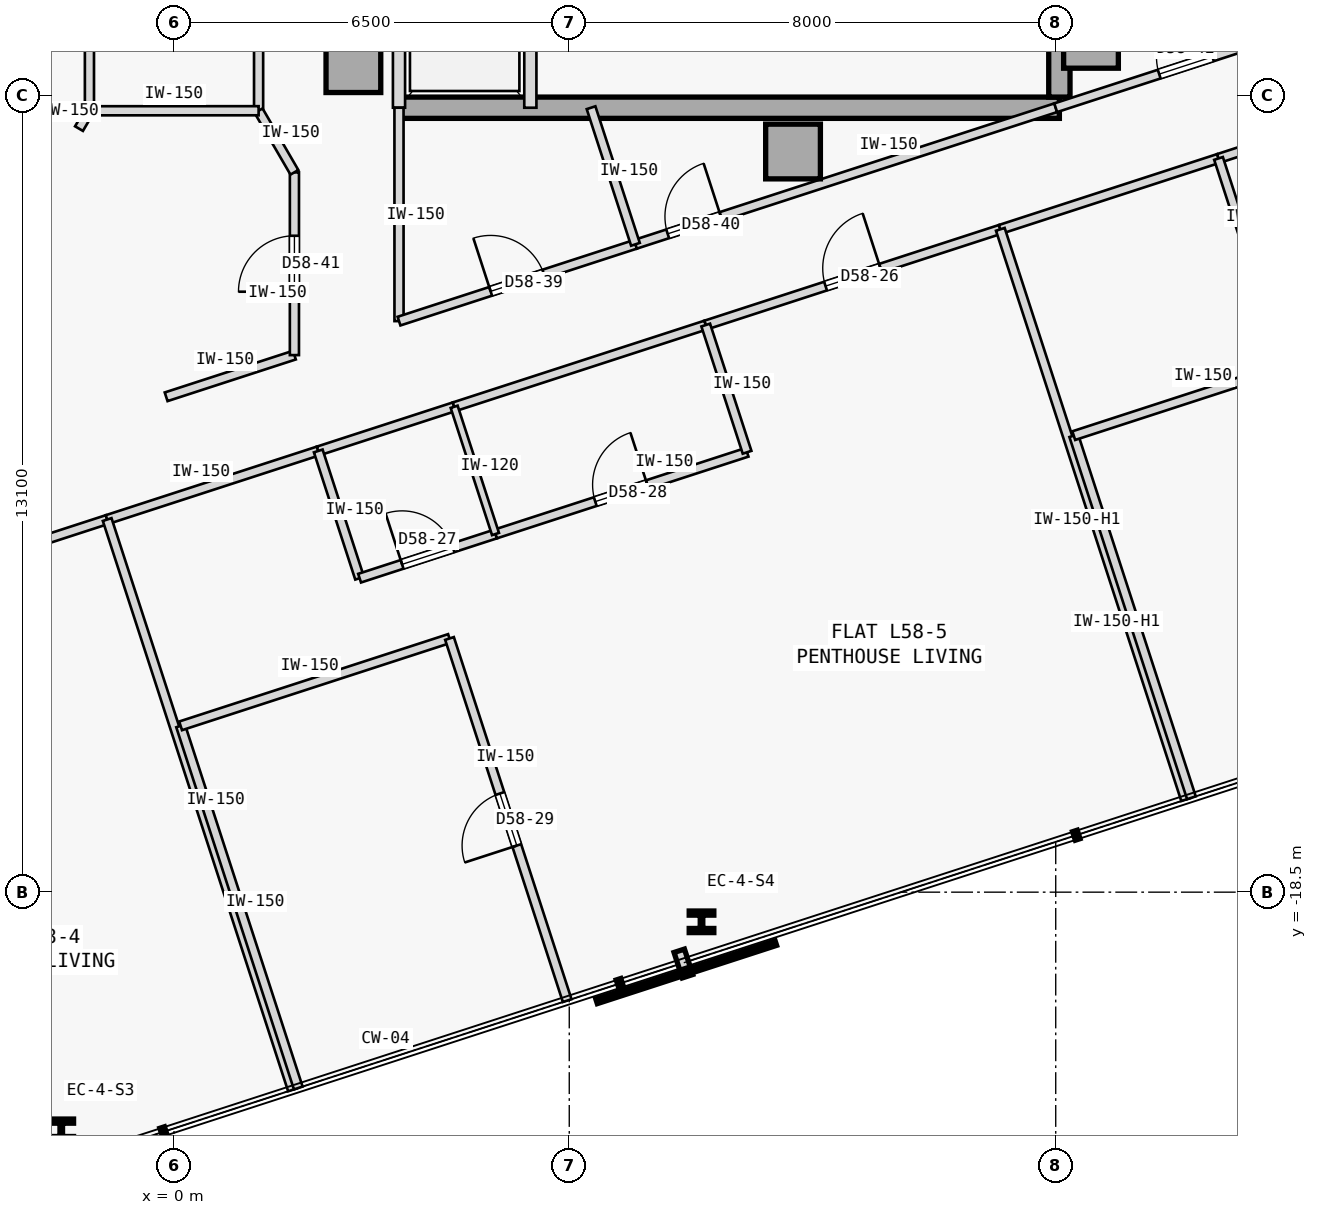
"""IFC4 building model, lengths in metres.
Left out: names, types, materials, properties, quantities, classifications, styles, units other than length and angle.
Written with IfcOpenShell. Run it as: python <this file> out.ifc"""

import sys

from ifc_helpers import new_model, si_unit, direction, frame, frame_2d, origin, origin_2d, place, context, subcontext, project, spatial, rectangle, i_section, extrude, element, fill, save


model = new_model("IFC4")
c1 = context("Model", 3, precision=1e-05, world=origin(), true_north=direction((0.0, 1.0)))
c2 = subcontext(c1, "Body", "Model", "MODEL_VIEW")
j1 = project(units=[si_unit("LENGTHUNIT", "METRE"), si_unit("PLANEANGLEUNIT", "RADIAN")], contexts=[c1])
p1 = place(None, origin())
s1 = spatial("IfcSite", under=j1, at=p1, CompositionType="ELEMENT")
p2 = place(p1, origin())
s2 = spatial("IfcBuilding", under=s1, at=p2, CompositionType="ELEMENT")
p3 = place(p2, frame((0.0, 0.0, 220.95)))
s3 = spatial("IfcBuildingStorey", under=s2, at=p3, CompositionType="ELEMENT", Elevation=220.95)
for number, where, z_axis, x_axis in (
    (1, (15.08, -4.5, 0.0), (0.0, 0.0, 1.0), (1.0, 0.0, 0.0)),
    (2, (10.18, -6.32, 0.0), (0.0, 0.0, 1.0), (1.0, 0.0, 0.0)),
    (3, (2.95, -4.9, 0.0), (0.0, 0.0, 1.0), (1.0, 0.0, 0.0)),
):
    element("IfcColumn", number, at=place(p3, frame(where, z_axis=z_axis, x_axis=x_axis)), inside=s3, PredefinedType="COLUMN", context=c2, shape_type="SweptSolid", body=[
        extrude(rectangle(XDim=0.9, YDim=0.9, at=origin_2d()), origin(), (0.0, 0.0, 1.0), 3.35),
    ])
p4 = place(p3, frame((3.7, -5.6, 0.0), z_axis=(0.0, 0.0, 1.0), x_axis=(1.0, 0.0, 0.0)))
e4 = element("IfcWall", 4, at=p4, inside=s3, PredefinedType="SHEAR", context=c2, shape_type="SweptSolid", body=[
    extrude(rectangle(XDim=10.86, YDim=0.35, at=frame_2d((5.43, 0.0))), origin(), (0.0, 0.0, 1.0), 3.125),
])
p5 = place(p3, frame((14.56, -5.425, 0.0), z_axis=(0.0, 0.0, 1.0), x_axis=(0.0, 1.0, 0.0)))
e5 = element("IfcWall", 5, at=p5, inside=s3, PredefinedType="SHEAR", context=c2, shape_type="SweptSolid", body=[
    extrude(rectangle(XDim=10.85, YDim=0.35, at=frame_2d((5.425, 0.0))), origin(), (0.0, 0.0, 1.0), 3.125),
])
for number, where, z_axis, x_axis in (
    (6, (-1.854, -22.409, 0.0), (0.0, 0.0, 1.0), (1.0, 0.0, 0.0)),
    (7, (8.675, -18.988, 0.0), (0.0, 0.0, 1.0), (1.0, 0.0, 0.0)),
):
    element("IfcColumn", number, at=place(p3, frame(where, z_axis=z_axis, x_axis=x_axis)), inside=s3, PredefinedType="COLUMN", context=c2, shape_type="SweptSolid", body=[
        extrude(i_section(OverallWidth=0.405, OverallDepth=0.355, WebThickness=0.042, FlangeThickness=0.068, FilletRadius=0.015, at=origin_2d()), origin(), (0.0, 0.0, 1.0), 3.35),
    ])
for number, where, z_axis, x_axis in (
    (8, (3.7, -5.6, 0.0), (0.0, 0.0, 1.0), (0.0, 1.0, 0.0)),
    (9, (5.86, -5.6, 0.0), (0.0, 0.0, 1.0), (0.0, 1.0, 0.0)),
):
    element("IfcWall", number, at=place(p3, frame(where, z_axis=z_axis, x_axis=x_axis)), inside=s3, PredefinedType="STANDARD", context=c2, shape_type="SweptSolid", body=[
        extrude(rectangle(XDim=2.65, YDim=0.2, at=frame_2d((1.325, 0.0))), origin(), (0.0, 0.0, 1.0), 3.125),
    ])
p6 = place(p3, frame((-1.391, -5.65, 0.0), z_axis=(0.0, 0.0, 1.0), x_axis=(-8.6422954e-05, 0.999999996266, 0.0)))
e10 = element("IfcWall", 10, at=p6, inside=s3, PredefinedType="PARTITIONING", context=c2, shape_type="SweptSolid", body=[
    extrude(rectangle(XDim=11.3, YDim=0.15, at=frame_2d((5.65, 0.0))), origin(), (0.0, 0.0, 1.0), 3.125),
])
p7 = place(p6, frame((5.175, 0.0, 0.0)))
e11 = element("IfcOpeningElement", 11, at=p7, cuts=e10, PredefinedType="OPENING", context=c2, shape_type="SweptSolid", body=[
    extrude(rectangle(XDim=0.95, YDim=2.15, at=frame_2d((0.475, 1.075))), frame((0.0, 0.085, 0.0), z_axis=(0.0, -1.0, 0.0), x_axis=(1.0, 0.0, 0.0)), (0.0, 0.0, 1.0), 0.17),
])
p8 = place(p3, frame((1.391, -5.648, 0.0), z_axis=(0.0, 0.0, 1.0), x_axis=(-4.3218947e-05, 0.999999999066, 0.0)))
e12 = element("IfcWall", 12, at=p8, inside=s3, PredefinedType="PARTITIONING", context=c2, shape_type="SweptSolid", body=[
    extrude(rectangle(XDim=11.298, YDim=0.15, at=frame_2d((5.649, 0.0))), origin(), (0.0, 0.0, 1.0), 3.125),
])
p9 = place(p3, frame((-4.856, -13.593, 0.0), z_axis=(0.0, 0.0, 1.0), x_axis=(0.951054051148, 0.309024581215, 0.0)))
e13 = element("IfcWall", 13, at=p9, inside=s3, PredefinedType="PARTITIONING", context=c2, shape_type="SweptSolid", body=[
    extrude(rectangle(XDim=3.95, YDim=0.15, at=frame_2d((1.975, 0.0))), origin(), (0.0, 0.0, 1.0), 3.125),
])
p10 = place(p9, frame((1.5, 0.0, 0.0)))
e14 = element("IfcOpeningElement", 14, at=p10, cuts=e13, PredefinedType="OPENING", context=c2, shape_type="SweptSolid", body=[
    extrude(rectangle(XDim=0.95, YDim=2.15, at=frame_2d((0.475, 1.075))), frame((0.0, 0.085, 0.0), z_axis=(0.0, -1.0, 0.0), x_axis=(1.0, 0.0, 0.0)), (0.0, 0.0, 1.0), 0.17),
])
p11 = place(p3, frame((-1.099, -12.372, 0.0), z_axis=(0.0, 0.0, 1.0), x_axis=(0.951057168147, 0.309014988174, 0.0)))
e15 = element("IfcWall", 15, at=p11, inside=s3, PredefinedType="PARTITIONING", context=c2, shape_type="SweptSolid", body=[
    extrude(rectangle(XDim=3.65, YDim=0.15, at=frame_2d((1.825, 0.0))), origin(), (0.0, 0.0, 1.0), 3.125),
])
p12 = place(p3, frame((8.744, -9.174, 0.0), z_axis=(0.0, 0.0, 1.0), x_axis=(0.95105238152, 0.309029719615, 0.0)))
e16 = element("IfcWall", 16, at=p12, inside=s3, PredefinedType="PARTITIONING", context=c2, shape_type="SweptSolid", body=[
    extrude(rectangle(XDim=5.094, YDim=0.15, at=frame_2d((2.547, 0.0))), origin(), (0.0, 0.0, 1.0), 3.125),
])
p13 = place(p12, frame((2.072, 0.0, 0.0)))
e17 = element("IfcOpeningElement", 17, at=p13, cuts=e16, PredefinedType="OPENING", context=c2, shape_type="SweptSolid", body=[
    extrude(rectangle(XDim=0.95, YDim=2.15, at=frame_2d((0.475, 1.075))), frame((0.0, 0.085, 0.0), z_axis=(0.0, -1.0, 0.0), x_axis=(1.0, 0.0, 0.0)), (0.0, 0.0, 1.0), 0.17),
])
p14 = place(p3, frame((2.372, -11.244, 0.0), z_axis=(0.0, 0.0, 1.0), x_axis=(0.951066131077, 0.308987401554, 0.0)))
e18 = element("IfcWall", 18, at=p14, inside=s3, PredefinedType="PARTITIONING", context=c2, shape_type="SweptSolid", body=[
    extrude(rectangle(XDim=2.35, YDim=0.15, at=frame_2d((1.175, 0.0))), origin(), (0.0, 0.0, 1.0), 3.125),
])
p15 = place(p3, frame((4.607, -10.518, 0.0), z_axis=(0.0, 0.0, 1.0), x_axis=(0.951052627573, 0.309028962374, 0.0)))
e19 = element("IfcWall", 19, at=p15, inside=s3, PredefinedType="PARTITIONING", context=c2, shape_type="SweptSolid", body=[
    extrude(rectangle(XDim=4.35, YDim=0.15, at=frame_2d((2.175, 0.0))), origin(), (0.0, 0.0, 1.0), 3.125),
])
p16 = place(p3, frame((13.589, -7.6, 0.0), z_axis=(0.0, 0.0, 1.0), x_axis=(0.95105023481, 0.30903632613, 0.0)))
e20 = element("IfcWall", 20, at=p16, inside=s3, PredefinedType="PARTITIONING", context=c2, shape_type="SweptSolid", body=[
    extrude(rectangle(XDim=3.773, YDim=0.15, at=frame_2d((1.886, 0.0))), origin(), (0.0, 0.0, 1.0), 3.125),
])
p17 = place(p3, frame((17.177, -6.434, 0.0), z_axis=(0.0, 0.0, 1.0), x_axis=(0.951066131077, 0.308987401554, 0.0)))
e21 = element("IfcWall", 21, at=p17, inside=s3, PredefinedType="PARTITIONING", context=c2, shape_type="SweptSolid", body=[
    extrude(rectangle(XDim=2.35, YDim=0.15, at=frame_2d((1.175, 0.0))), origin(), (0.0, 0.0, 1.0), 3.125),
])
p18 = place(p3, frame((3.7, -9.109, 0.0), z_axis=(0.0, 0.0, 1.0), x_axis=(-0.000139130433, 0.999999990321, 0.0)))
e22 = element("IfcWall", 22, at=p18, inside=s3, PredefinedType="PARTITIONING", context=c2, shape_type="SweptSolid", body=[
    extrude(rectangle(XDim=3.51, YDim=0.15, at=frame_2d((1.755, 0.0))), origin(), (0.0, 0.0, 1.0), 3.125),
])
p19 = place(p3, frame((3.7, -9.109, 0.0), z_axis=(0.0, 0.0, 1.0), x_axis=(0.95106259184, 0.308998295145, 0.0)))
e23 = element("IfcWall", 23, at=p19, inside=s3, PredefinedType="PARTITIONING", context=c2, shape_type="SweptSolid", body=[
    extrude(rectangle(XDim=4.088, YDim=0.15, at=frame_2d((2.044, 0.0))), origin(), (0.0, 0.0, 1.0), 3.125),
])
p20 = place(p19, frame((1.584, 0.0, 0.0)))
e24 = element("IfcOpeningElement", 24, at=p20, cuts=e23, PredefinedType="OPENING", context=c2, shape_type="SweptSolid", body=[
    extrude(rectangle(XDim=0.92, YDim=2.15, at=frame_2d((0.46, 1.075))), frame((0.0, 0.085, 0.0), z_axis=(0.0, -1.0, 0.0), x_axis=(1.0, 0.0, 0.0)), (0.0, 0.0, 1.0), 0.17),
])
p21 = place(p3, frame((7.588, -7.846, 0.0), z_axis=(0.0, 0.0, 1.0), x_axis=(0.951058013903, 0.309012385174, 0.0)))
e25 = element("IfcWall", 25, at=p21, inside=s3, PredefinedType="PARTITIONING", context=c2, shape_type="SweptSolid", body=[
    extrude(rectangle(XDim=7.267, YDim=0.15, at=frame_2d((3.634, 0.0))), origin(), (0.0, 0.0, 1.0), 3.125),
])
p22 = place(p21, frame((0.557, 0.0, 0.0)))
e26 = element("IfcOpeningElement", 26, at=p22, cuts=e25, PredefinedType="OPENING", context=c2, shape_type="SweptSolid", body=[
    extrude(rectangle(XDim=0.92, YDim=2.15, at=frame_2d((0.46, 1.075))), frame((0.0, 0.085, 0.0), z_axis=(0.0, -1.0, 0.0), x_axis=(1.0, 0.0, 0.0)), (0.0, 0.0, 1.0), 0.17),
])
p23 = place(p3, frame((-0.129, -10.354, 0.0), z_axis=(0.0, 0.0, 1.0), x_axis=(0.951066420845, 0.308986509643, 0.0)))
e27 = element("IfcWall", 27, at=p23, inside=s3, PredefinedType="PARTITIONING", context=c2, shape_type="SweptSolid", body=[
    extrude(rectangle(XDim=2.218, YDim=0.15, at=frame_2d((1.109, 0.0))), origin(), (0.0, 0.0, 1.0), 3.125),
])
p24 = place(p3, frame((-1.562, -5.944, 0.0), z_axis=(0.0, 0.0, 1.0), x_axis=(0.505387839696, 0.862892305845, 0.0)))
e28 = element("IfcWall", 28, at=p24, inside=s3, PredefinedType="PARTITIONING", context=c2, shape_type="SweptSolid", body=[
    extrude(rectangle(XDim=0.34, YDim=0.15, at=frame_2d((0.17, 0.0))), origin(), (0.0, 0.0, 1.0), 3.125),
])
p25 = place(p3, frame((1.98, -9.668, 0.0), z_axis=(0.0, 0.0, 1.0), x_axis=(8.1241368e-05, 0.9999999967, 0.0)))
e29 = element("IfcWall", 29, at=p25, inside=s3, PredefinedType="PARTITIONING", context=c2, shape_type="SweptSolid", body=[
    extrude(rectangle(XDim=3.005, YDim=0.15, at=frame_2d((1.502, 0.0))), origin(), (0.0, 0.0, 1.0), 3.125),
])
p26 = place(p25, frame((1.042, 0.0, 0.0)))
e30 = element("IfcOpeningElement", 30, at=p26, cuts=e29, PredefinedType="OPENING", context=c2, shape_type="SweptSolid", body=[
    extrude(rectangle(XDim=0.92, YDim=2.15, at=frame_2d((0.46, 1.075))), frame((0.0, 0.085, 0.0), z_axis=(0.0, -1.0, 0.0), x_axis=(1.0, 0.0, 0.0)), (0.0, 0.0, 1.0), 0.17),
])
p27 = place(p3, frame((1.391, -5.649, 0.0), z_axis=(0.0, 0.0, 1.0), x_axis=(0.502522642426, -0.864564048437, 0.0)))
e31 = element("IfcWall", 31, at=p27, inside=s3, PredefinedType="PARTITIONING", context=c2, shape_type="SweptSolid", body=[
    extrude(rectangle(XDim=1.171, YDim=0.15, at=frame_2d((0.586, 0.0))), origin(), (0.0, 0.0, 1.0), 3.125),
])
p28 = place(p3, frame((14.5, -5.6, 0.0), z_axis=(0.0, 0.0, 1.0), x_axis=(0.951047546178, 0.309044600193, 0.0)))
e32 = element("IfcWall", 32, at=p28, inside=s3, PredefinedType="PARTITIONING", context=c2, shape_type="SweptSolid", body=[
    extrude(rectangle(XDim=3.461, YDim=0.15, at=frame_2d((1.73, 0.0))), origin(), (0.0, 0.0, 1.0), 3.125),
])
p29 = place(p28, frame((1.79, 0.0, 0.0)))
e33 = element("IfcOpeningElement", 33, at=p29, cuts=e32, PredefinedType="OPENING", context=c2, shape_type="SweptSolid", body=[
    extrude(rectangle(XDim=0.92, YDim=2.15, at=frame_2d((0.46, 1.075))), frame((0.0, 0.085, 0.0), z_axis=(0.0, -1.0, 0.0), x_axis=(1.0, 0.0, 0.0)), (0.0, 0.0, 1.0), 0.17),
])
p30 = place(p3, frame((-1.391, -5.65, 0.0), z_axis=(0.0, 0.0, 1.0), x_axis=(0.999999965344, 0.000263273356, 0.0)))
e34 = element("IfcWall", 34, at=p30, inside=s3, PredefinedType="PARTITIONING", context=c2, shape_type="SweptSolid", body=[
    extrude(rectangle(XDim=2.782, YDim=0.15, at=frame_2d((1.391, 0.0))), origin(), (0.0, 0.0, 1.0), 3.125),
])
p31 = place(p3, frame((1.948, -21.751, 0.0), z_axis=(0.0, 0.0, 1.0), x_axis=(-0.308999867152, 0.951062081097, 0.0)))
e35 = element("IfcWall", 35, at=p31, inside=s3, PredefinedType="PARTITIONING", context=c2, shape_type="SweptSolid", body=[
    extrude(rectangle(XDim=9.862, YDim=0.15, at=frame_2d((4.931, 0.0))), origin(), (0.0, 0.0, 1.0), 3.125),
])
p32 = place(p3, frame((3.052, -13.336, 0.0), z_axis=(0.0, 0.0, 1.0), x_axis=(-0.308960600764, 0.951074837842, 0.0)))
e36 = element("IfcWall", 36, at=p32, inside=s3, PredefinedType="PARTITIONING", context=c2, shape_type="SweptSolid", body=[
    extrude(rectangle(XDim=2.2, YDim=0.15, at=frame_2d((1.1, 0.0))), origin(), (0.0, 0.0, 1.0), 3.125),
])
p33 = place(p3, frame((3.052, -13.336, 0.0), z_axis=(0.0, 0.0, 1.0), x_axis=(0.951076048914, 0.308956872689, 0.0)))
e37 = element("IfcWall", 37, at=p33, inside=s3, PredefinedType="PARTITIONING", context=c2, shape_type="SweptSolid", body=[
    extrude(rectangle(XDim=2.35, YDim=0.15, at=frame_2d((1.175, 0.0))), origin(), (0.0, 0.0, 1.0), 3.125),
])
p34 = place(p33, frame((0.735, 0.0, 0.0)))
e38 = element("IfcOpeningElement", 38, at=p34, cuts=e37, PredefinedType="OPENING", context=c2, shape_type="SweptSolid", body=[
    extrude(rectangle(XDim=0.88, YDim=2.15, at=frame_2d((0.44, 1.075))), frame((0.0, 0.085, 0.0), z_axis=(0.0, -1.0, 0.0), x_axis=(1.0, 0.0, 0.0)), (0.0, 0.0, 1.0), 0.17),
])
p35 = place(p3, frame((5.287, -12.61, 0.0), z_axis=(0.0, 0.0, 1.0), x_axis=(0.951052627573, 0.309028962374, 0.0)))
e39 = element("IfcWall", 39, at=p35, inside=s3, PredefinedType="PARTITIONING", context=c2, shape_type="SweptSolid", body=[
    extrude(rectangle(XDim=4.35, YDim=0.15, at=frame_2d((2.175, 0.0))), origin(), (0.0, 0.0, 1.0), 3.125),
])
p36 = place(p35, frame((1.725, 0.0, 0.0)))
e40 = element("IfcOpeningElement", 40, at=p36, cuts=e39, PredefinedType="OPENING", context=c2, shape_type="SweptSolid", body=[
    extrude(rectangle(XDim=0.9, YDim=2.15, at=frame_2d((0.45, 1.075))), frame((0.0, 0.085, 0.0), z_axis=(0.0, -1.0, 0.0), x_axis=(1.0, 0.0, 0.0)), (0.0, 0.0, 1.0), 0.17),
])
p37 = place(p3, frame((9.424, -11.266, 0.0), z_axis=(0.0, 0.0, 1.0), x_axis=(-0.309060979314, 0.951042223598, 0.0)))
e41 = element("IfcWall", 41, at=p37, inside=s3, PredefinedType="PARTITIONING", context=c2, shape_type="SweptSolid", body=[
    extrude(rectangle(XDim=2.2, YDim=0.15, at=frame_2d((1.1, 0.0))), origin(), (0.0, 0.0, 1.0), 3.125),
])
p38 = place(p3, frame((2.043, -21.72, 0.0), z_axis=(0.0, 0.0, 1.0), x_axis=(-0.309013782848, 0.951057559777, 0.0)))
e42 = element("IfcWall", 42, at=p38, inside=s3, PredefinedType="PARTITIONING", context=c2, shape_type="SweptSolid", body=[
    extrude(rectangle(XDim=6.262, YDim=0.15, at=frame_2d((3.131, 0.0))), origin(), (0.0, 0.0, 1.0), 3.125),
])
p39 = place(p3, frame((0.108, -15.765, 0.0), z_axis=(0.0, 0.0, 1.0), x_axis=(0.951065702951, 0.308988719326, 0.0)))
e43 = element("IfcWall", 43, at=p39, inside=s3, PredefinedType="PARTITIONING", context=c2, shape_type="SweptSolid", body=[
    extrude(rectangle(XDim=4.65, YDim=0.15, at=frame_2d((2.325, 0.0))), origin(), (0.0, 0.0, 1.0), 3.125),
])
p40 = place(p3, frame((6.466, -20.284, 0.0), z_axis=(0.0, 0.0, 1.0), x_axis=(-0.309013782848, 0.951057559777, 0.0)))
e44 = element("IfcWall", 44, at=p40, inside=s3, PredefinedType="PARTITIONING", context=c2, shape_type="SweptSolid", body=[
    extrude(rectangle(XDim=6.262, YDim=0.15, at=frame_2d((3.131, 0.0))), origin(), (0.0, 0.0, 1.0), 3.125),
])
p41 = place(p40, frame((2.681, 0.0, 0.0)))
e45 = element("IfcOpeningElement", 45, at=p41, cuts=e44, PredefinedType="OPENING", context=c2, shape_type="SweptSolid", body=[
    extrude(rectangle(XDim=0.9, YDim=2.15, at=frame_2d((0.45, 1.075))), frame((0.0, 0.085, 0.0), z_axis=(0.0, -1.0, 0.0), x_axis=(1.0, 0.0, 0.0)), (0.0, 0.0, 1.0), 0.17),
])
p42 = place(p3, frame((16.636, -16.979, 0.0), z_axis=(0.0, 0.0, 1.0), x_axis=(-0.309022258842, 0.95105480575, 0.0)))
e46 = element("IfcWall", 46, at=p42, inside=s3, PredefinedType="PARTITIONING", context=c2, shape_type="SweptSolid", body=[
    extrude(rectangle(XDim=9.862, YDim=0.15, at=frame_2d((4.931, 0.0))), origin(), (0.0, 0.0, 1.0), 2.675),
])
p43 = place(p3, frame((5.287, -12.61, 0.0), z_axis=(0.0, 0.0, 1.0), x_axis=(-0.309060979314, 0.951042223598, 0.0)))
e47 = element("IfcWall", 47, at=p43, inside=s3, PredefinedType="PARTITIONING", context=c2, shape_type="SweptSolid", body=[
    extrude(rectangle(XDim=2.2, YDim=0.12, at=frame_2d((1.1, 0.0))), origin(), (0.0, 0.0, 1.0), 3.125),
])
p44 = place(p3, frame((17.857, -8.526, 0.0), z_axis=(0.0, 0.0, 1.0), x_axis=(-0.309060979314, 0.951042223598, 0.0)))
e48 = element("IfcWall", 48, at=p44, inside=s3, PredefinedType="PARTITIONING", context=c2, shape_type="SweptSolid", body=[
    extrude(rectangle(XDim=2.2, YDim=0.15, at=frame_2d((1.1, 0.0))), origin(), (0.0, 0.0, 1.0), 3.125),
])
p45 = place(p3, frame((16.731, -16.948, 0.0), z_axis=(0.0, 0.0, 1.0), x_axis=(-0.309013782848, 0.951057559777, 0.0)))
e49 = element("IfcWall", 49, at=p45, inside=s3, PredefinedType="PARTITIONING", context=c2, shape_type="SweptSolid", body=[
    extrude(rectangle(XDim=6.262, YDim=0.15, at=frame_2d((3.131, 0.0))), origin(), (0.0, 0.0, 1.0), 2.675),
])
p46 = place(p3, frame((14.796, -10.992, 0.0), z_axis=(0.0, 0.0, 1.0), x_axis=(0.951070715387, 0.308973290646, 0.0)))
e50 = element("IfcWall", 50, at=p46, inside=s3, PredefinedType="PARTITIONING", context=c2, shape_type="SweptSolid", body=[
    extrude(rectangle(XDim=4.65, YDim=0.15, at=frame_2d((2.325, 0.0))), origin(), (0.0, 0.0, 1.0), 3.125),
])
p47 = place(p3, frame((7.588, -7.846, 0.0), z_axis=(0.0, 0.0, 1.0), x_axis=(-0.309055688452, 0.951043942957, 0.0)))
e51 = element("IfcWall", 51, at=p47, inside=s3, PredefinedType="PARTITIONING", context=c2, shape_type="SweptSolid", body=[
    extrude(rectangle(XDim=2.362, YDim=0.15, at=frame_2d((1.181, 0.0))), origin(), (0.0, 0.0, 1.0), 3.125),
])
p48 = place(p13, origin())
e52 = element("IfcDoor", 52, at=p48, inside=s3, OperationType="SINGLE_SWING_RIGHT", PredefinedType="DOOR", context=c2, shape_type="SweptSolid", body=[
    extrude(rectangle(XDim=0.95, YDim=2.15, at=frame_2d((0.475, 1.075))), frame((0.0, 0.025, 0.0), z_axis=(0.0, -1.0, 0.0), x_axis=(1.0, 0.0, 0.0)), (0.0, 0.0, 1.0), 0.05),
])
fill(e17, e52)
p49 = place(p34, origin())
e53 = element("IfcDoor", 53, at=p49, inside=s3, OperationType="SINGLE_SWING_LEFT", PredefinedType="DOOR", context=c2, shape_type="SweptSolid", body=[
    extrude(rectangle(XDim=0.88, YDim=2.15, at=frame_2d((0.44, 1.075))), frame((0.0, 0.025, 0.0), z_axis=(0.0, -1.0, 0.0), x_axis=(1.0, 0.0, 0.0)), (0.0, 0.0, 1.0), 0.05),
])
fill(e38, e53)
p50 = place(p36, origin())
e54 = element("IfcDoor", 54, at=p50, inside=s3, OperationType="SINGLE_SWING_RIGHT", PredefinedType="DOOR", context=c2, shape_type="SweptSolid", body=[
    extrude(rectangle(XDim=0.9, YDim=2.15, at=frame_2d((0.45, 1.075))), frame((0.0, 0.025, 0.0), z_axis=(0.0, -1.0, 0.0), x_axis=(1.0, 0.0, 0.0)), (0.0, 0.0, 1.0), 0.05),
])
fill(e40, e54)
p51 = place(p41, origin())
e55 = element("IfcDoor", 55, at=p51, inside=s3, OperationType="SINGLE_SWING_LEFT", PredefinedType="DOOR", context=c2, shape_type="SweptSolid", body=[
    extrude(rectangle(XDim=0.9, YDim=2.15, at=frame_2d((0.45, 1.075))), frame((0.0, 0.025, 0.0), z_axis=(0.0, -1.0, 0.0), x_axis=(1.0, 0.0, 0.0)), (0.0, 0.0, 1.0), 0.05),
])
fill(e45, e55)
p52 = place(p20, origin())
e56 = element("IfcDoor", 56, at=p52, inside=s3, OperationType="SINGLE_SWING_LEFT", PredefinedType="DOOR", context=c2, shape_type="SweptSolid", body=[
    extrude(rectangle(XDim=0.92, YDim=2.15, at=frame_2d((0.46, 1.075))), frame((0.0, 0.025, 0.0), z_axis=(0.0, -1.0, 0.0), x_axis=(1.0, 0.0, 0.0)), (0.0, 0.0, 1.0), 0.05),
])
fill(e24, e56)
p53 = place(p22, origin())
e57 = element("IfcDoor", 57, at=p53, inside=s3, OperationType="SINGLE_SWING_RIGHT", PredefinedType="DOOR", context=c2, shape_type="SweptSolid", body=[
    extrude(rectangle(XDim=0.92, YDim=2.15, at=frame_2d((0.46, 1.075))), frame((0.0, 0.025, 0.0), z_axis=(0.0, -1.0, 0.0), x_axis=(1.0, 0.0, 0.0)), (0.0, 0.0, 1.0), 0.05),
])
fill(e26, e57)
p54 = place(p26, origin())
e58 = element("IfcDoor", 58, at=p54, inside=s3, OperationType="SINGLE_SWING_LEFT", PredefinedType="DOOR", context=c2, shape_type="SweptSolid", body=[
    extrude(rectangle(XDim=0.92, YDim=2.15, at=frame_2d((0.46, 1.075))), frame((0.0, 0.025, 0.0), z_axis=(0.0, -1.0, 0.0), x_axis=(1.0, 0.0, 0.0)), (0.0, 0.0, 1.0), 0.05),
])
fill(e30, e58)
p55 = place(p29, origin())
e59 = element("IfcDoor", 59, at=p55, inside=s3, OperationType="SINGLE_SWING_RIGHT", PredefinedType="DOOR", context=c2, shape_type="SweptSolid", body=[
    extrude(rectangle(XDim=0.92, YDim=2.15, at=frame_2d((0.46, 1.075))), frame((0.0, 0.025, 0.0), z_axis=(0.0, -1.0, 0.0), x_axis=(1.0, 0.0, 0.0)), (0.0, 0.0, 1.0), 0.05),
])
fill(e33, e59)
save(model, sys.argv[1])
